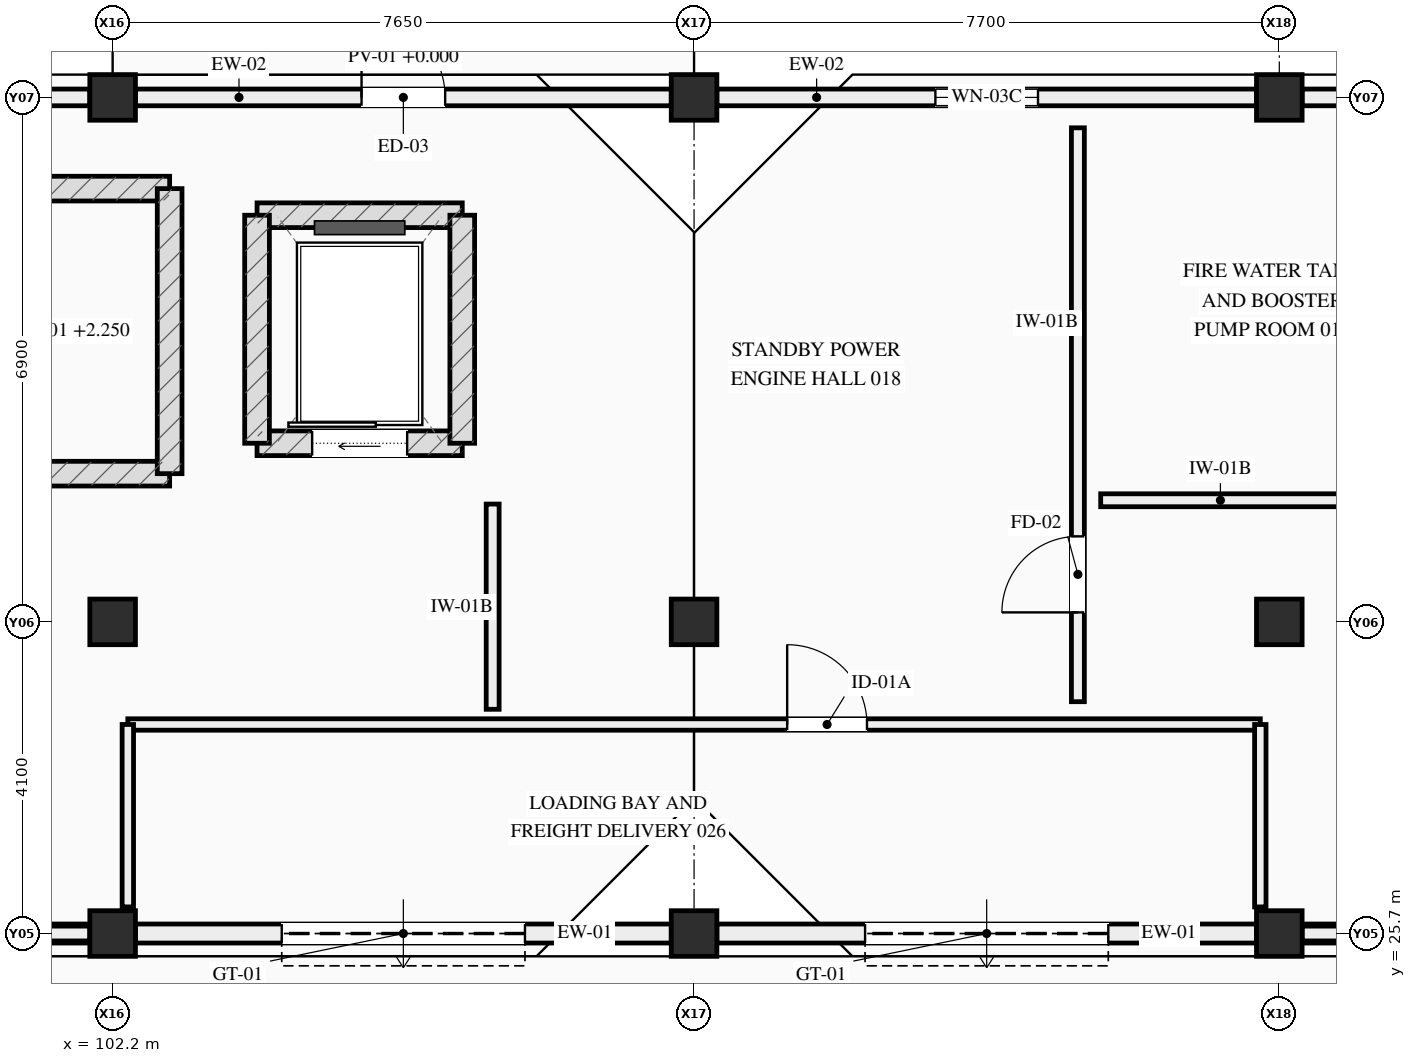
"""IFC4 building model, lengths in metres.
Left out: names, types, materials, properties, quantities, classifications, styles, units other than length and angle.
Written with IfcOpenShell. Run it as: python <this file> out.ifc"""

import sys

from ifc_helpers import new_model, si_unit, direction, frame, frame_2d, origin, origin_2d, place, context, subcontext, project, spatial, rectangle, extrude, element, fill, save


model = new_model("IFC4")
c1 = context("Model", 3, precision=1e-05, world=origin(), true_north=direction((0.0, 1.0)))
c2 = subcontext(c1, "Body", "Model", "MODEL_VIEW")
j1 = project(units=[si_unit("LENGTHUNIT", "METRE"), si_unit("PLANEANGLEUNIT", "RADIAN")], contexts=[c1])
p1 = place(None, origin())
s1 = spatial("IfcSite", under=j1, at=p1, CompositionType="ELEMENT")
p2 = place(p1, origin())
s2 = spatial("IfcBuilding", under=s1, at=p2, CompositionType="ELEMENT")
p3 = place(p2, origin())
s3 = spatial("IfcBuildingStorey", under=s2, at=p3, CompositionType="ELEMENT", Elevation=0.0)
for number, where, z_axis, x_axis in (
    (1, (102.2, 25.7, 0.0), (0.0, 0.0, 1.0), (1.0, 0.0, 0.0)),
    (2, (102.2, 29.8, 0.0), (0.0, 0.0, 1.0), (1.0, 0.0, 0.0)),
    (3, (102.2, 36.7, 0.0), (0.0, 0.0, 1.0), (1.0, 0.0, 0.0)),
    (4, (109.85, 25.7, 0.0), (0.0, 0.0, 1.0), (1.0, 0.0, 0.0)),
    (5, (109.85, 29.8, 0.0), (0.0, 0.0, 1.0), (1.0, 0.0, 0.0)),
    (6, (109.85, 36.7, 0.0), (0.0, 0.0, 1.0), (1.0, 0.0, 0.0)),
    (7, (117.55, 25.7, 0.0), (0.0, 0.0, 1.0), (1.0, 0.0, 0.0)),
    (8, (117.55, 29.8, 0.0), (0.0, 0.0, 1.0), (1.0, 0.0, 0.0)),
    (9, (117.55, 36.7, 0.0), (0.0, 0.0, 1.0), (1.0, 0.0, 0.0)),
):
    element("IfcColumn", number, at=place(p3, frame(where, z_axis=z_axis, x_axis=x_axis)), inside=s3, PredefinedType="COLUMN", context=c2, shape_type="SweptSolid", body=[
        extrude(rectangle(XDim=0.6, YDim=0.6, at=origin_2d()), origin(), (0.0, 0.0, 1.0), 4.5),
    ])
p4 = place(p3, frame((101.9, 25.7, 0.0), z_axis=(0.0, 0.0, 1.0), x_axis=(-1.0, 0.0, 0.0)))
e10 = element("IfcWall", 10, at=p4, inside=s3, PredefinedType="STANDARD", context=c2, shape_type="SweptSolid", body=[
    extrude(rectangle(XDim=7.0, YDim=0.25, at=frame_2d((3.5, 0.0))), origin(), (0.0, 0.0, 1.0), 2.985),
])
p5 = place(p4, frame((2.4, 0.0, 0.88)))
e11 = element("IfcOpeningElement", 11, at=p5, cuts=e10, PredefinedType="OPENING", context=c2, shape_type="SweptSolid", body=[
    extrude(rectangle(XDim=2.2, YDim=1.45, at=frame_2d((1.1, 0.725))), frame((0.0, 0.135, 0.0), z_axis=(0.0, -1.0, 0.0), x_axis=(1.0, 0.0, 0.0)), (0.0, 0.0, 1.0), 0.27),
])
p6 = place(p3, frame((101.9, 25.7, 3.35), z_axis=(0.0, 0.0, 1.0), x_axis=(-1.0, 0.0, 0.0)))
e12 = element("IfcWall", 12, at=p6, inside=s3, PredefinedType="STANDARD", context=c2, shape_type="SweptSolid", body=[
    extrude(rectangle(XDim=7.0, YDim=0.195, at=frame_2d((3.5, 0.0))), origin(), (0.0, 0.0, 1.0), 0.23),
])
p7 = place(p3, frame((94.9, 36.7, 0.0), z_axis=(0.0, 0.0, 1.0), x_axis=(1.0, 0.0, 0.0)))
e13 = element("IfcWall", 13, at=p7, inside=s3, PredefinedType="STANDARD", context=c2, shape_type="SweptSolid", body=[
    extrude(rectangle(XDim=7.0, YDim=0.22, at=frame_2d((3.5, 0.0))), origin(), (0.0, 0.0, 1.0), 3.58),
])
p8 = place(p7, frame((2.5, 0.0, 0.92)))
e14 = element("IfcOpeningElement", 14, at=p8, cuts=e13, PredefinedType="OPENING", context=c2, shape_type="SweptSolid", body=[
    extrude(rectangle(XDim=2.0, YDim=1.5, at=frame_2d((1.0, 0.75))), frame((0.0, 0.12, 0.0), z_axis=(0.0, -1.0, 0.0), x_axis=(1.0, 0.0, 0.0)), (0.0, 0.0, 1.0), 0.24),
])
p9 = place(p3, frame((109.55, 25.7, 0.0), z_axis=(0.0, 0.0, 1.0), x_axis=(-1.0, 0.0, 0.0)))
e15 = element("IfcWall", 15, at=p9, inside=s3, PredefinedType="STANDARD", context=c2, shape_type="SweptSolid", body=[
    extrude(rectangle(XDim=7.05, YDim=0.25, at=frame_2d((3.525, 0.0))), origin(), (0.0, 0.0, 1.0), 3.39),
])
p10 = place(p9, frame((1.925, 0.0, 0.0)))
e16 = element("IfcOpeningElement", 16, at=p10, cuts=e15, PredefinedType="OPENING", context=c2, shape_type="SweptSolid", body=[
    extrude(rectangle(XDim=3.2, YDim=2.95, at=frame_2d((1.6, 1.475))), frame((0.0, 0.135, 0.0), z_axis=(0.0, -1.0, 0.0), x_axis=(1.0, 0.0, 0.0)), (0.0, 0.0, 1.0), 0.27),
])
p11 = place(p3, frame((102.5, 36.7, 0.0), z_axis=(0.0, 0.0, 1.0), x_axis=(1.0, 0.0, 0.0)))
e17 = element("IfcWall", 17, at=p11, inside=s3, PredefinedType="STANDARD", context=c2, shape_type="SweptSolid", body=[
    extrude(rectangle(XDim=7.05, YDim=0.22, at=frame_2d((3.525, 0.0))), origin(), (0.0, 0.0, 1.0), 3.58),
])
p12 = place(p11, frame((2.975, 0.0, 0.0)))
e18 = element("IfcOpeningElement", 18, at=p12, cuts=e17, PredefinedType="OPENING", context=c2, shape_type="SweptSolid", body=[
    extrude(rectangle(XDim=1.1, YDim=2.2, at=frame_2d((0.55, 1.1))), frame((0.0, 0.12, 0.0), z_axis=(0.0, -1.0, 0.0), x_axis=(1.0, 0.0, 0.0)), (0.0, 0.0, 1.0), 0.24),
])
p13 = place(p3, frame((117.25, 25.7, 0.0), z_axis=(0.0, 0.0, 1.0), x_axis=(-1.0, 0.0, 0.0)))
e19 = element("IfcWall", 19, at=p13, inside=s3, PredefinedType="STANDARD", context=c2, shape_type="SweptSolid", body=[
    extrude(rectangle(XDim=7.1, YDim=0.25, at=frame_2d((3.55, 0.0))), origin(), (0.0, 0.0, 1.0), 3.39),
])
p14 = place(p13, frame((1.95, 0.0, 0.0)))
e20 = element("IfcOpeningElement", 20, at=p14, cuts=e19, PredefinedType="OPENING", context=c2, shape_type="SweptSolid", body=[
    extrude(rectangle(XDim=3.2, YDim=2.95, at=frame_2d((1.6, 1.475))), frame((0.0, 0.135, 0.0), z_axis=(0.0, -1.0, 0.0), x_axis=(1.0, 0.0, 0.0)), (0.0, 0.0, 1.0), 0.27),
])
p15 = place(p3, frame((110.15, 36.7, 0.0), z_axis=(0.0, 0.0, 1.0), x_axis=(1.0, 0.0, 0.0)))
e21 = element("IfcWall", 21, at=p15, inside=s3, PredefinedType="STANDARD", context=c2, shape_type="SweptSolid", body=[
    extrude(rectangle(XDim=7.1, YDim=0.22, at=frame_2d((3.55, 0.0))), origin(), (0.0, 0.0, 1.0), 3.58),
])
p16 = place(p15, frame((2.875, 0.0, 0.98)))
e22 = element("IfcOpeningElement", 22, at=p16, cuts=e21, PredefinedType="OPENING", context=c2, shape_type="SweptSolid", body=[
    extrude(rectangle(XDim=1.35, YDim=1.35, at=frame_2d((0.675, 0.675))), frame((0.0, 0.12, 0.0), z_axis=(0.0, -1.0, 0.0), x_axis=(1.0, 0.0, 0.0)), (0.0, 0.0, 1.0), 0.24),
])
p17 = place(p3, frame((124.95, 25.7, 0.0), z_axis=(0.0, 0.0, 1.0), x_axis=(-1.0, 0.0, 0.0)))
e23 = element("IfcWall", 23, at=p17, inside=s3, PredefinedType="STANDARD", context=c2, shape_type="SweptSolid", body=[
    extrude(rectangle(XDim=7.1, YDim=0.25, at=frame_2d((3.55, 0.0))), origin(), (0.0, 0.0, 1.0), 2.985),
])
p18 = place(p17, frame((3.025, 0.0, 1.02)))
e24 = element("IfcOpeningElement", 24, at=p18, cuts=e23, PredefinedType="OPENING", context=c2, shape_type="SweptSolid", body=[
    extrude(rectangle(XDim=1.05, YDim=1.2, at=frame_2d((0.525, 0.6))), frame((0.0, 0.135, 0.0), z_axis=(0.0, -1.0, 0.0), x_axis=(1.0, 0.0, 0.0)), (0.0, 0.0, 1.0), 0.27),
])
p19 = place(p3, frame((124.95, 25.7, 3.35), z_axis=(0.0, 0.0, 1.0), x_axis=(-1.0, 0.0, 0.0)))
e25 = element("IfcWall", 25, at=p19, inside=s3, PredefinedType="STANDARD", context=c2, shape_type="SweptSolid", body=[
    extrude(rectangle(XDim=7.1, YDim=0.195, at=frame_2d((3.55, 0.0))), origin(), (0.0, 0.0, 1.0), 0.23),
])
p20 = place(p3, frame((117.85, 36.7, 0.0), z_axis=(0.0, 0.0, 1.0), x_axis=(1.0, 0.0, 0.0)))
e26 = element("IfcWall", 26, at=p20, inside=s3, PredefinedType="STANDARD", context=c2, shape_type="SweptSolid", body=[
    extrude(rectangle(XDim=7.1, YDim=0.22, at=frame_2d((3.55, 0.0))), origin(), (0.0, 0.0, 1.0), 3.58),
])
p21 = place(p20, frame((2.05, 0.0, 0.88)))
e27 = element("IfcOpeningElement", 27, at=p21, cuts=e26, PredefinedType="OPENING", context=c2, shape_type="SweptSolid", body=[
    extrude(rectangle(XDim=3.0, YDim=1.45, at=frame_2d((1.5, 0.725))), frame((0.0, 0.12, 0.0), z_axis=(0.0, -1.0, 0.0), x_axis=(1.0, 0.0, 0.0)), (0.0, 0.0, 1.0), 0.24),
])
for number, where, z_axis, x_axis in (
    (28, (102.95, 31.75, 0.0), (0.0, 0.0, 1.0), (-1.0, 0.0, 0.0)),
    (29, (95.25, 35.5, 0.0), (0.0, 0.0, 1.0), (1.0, 0.0, 0.0)),
):
    element("IfcWall", number, at=place(p3, frame(where, z_axis=z_axis, x_axis=x_axis)), inside=s3, PredefinedType="SHEAR", context=c2, shape_type="SweptSolid", body=[
        extrude(rectangle(XDim=7.7, YDim=0.325, at=frame_2d((3.85, 0.0))), origin(), (0.0, 0.0, 1.0), 4.26),
    ])
p22 = place(p3, frame((102.95, 35.5, 0.0), z_axis=(0.0, 0.0, 1.0), x_axis=(0.0, -1.0, 0.0)))
e30 = element("IfcWall", 30, at=p22, inside=s3, PredefinedType="SHEAR", context=c2, shape_type="SweptSolid", body=[
    extrude(rectangle(XDim=3.75, YDim=0.325, at=frame_2d((1.875, 0.0))), origin(), (0.0, 0.0, 1.0), 4.26),
])
p23 = place(p3, frame((104.1, 32.15, 0.0), z_axis=(0.0, 0.0, 1.0), x_axis=(1.0, 0.0, 0.0)))
e31 = element("IfcWall", 31, at=p23, inside=s3, PredefinedType="SHEAR", context=c2, shape_type="SweptSolid", body=[
    extrude(rectangle(XDim=2.7, YDim=0.325, at=frame_2d((1.35, 0.0))), origin(), (0.0, 0.0, 1.0), 4.26),
])
p24 = place(p23, frame((0.725, 0.0, 0.0)))
e32 = element("IfcOpeningElement", 32, at=p24, cuts=e31, PredefinedType="OPENING", context=c2, shape_type="SweptSolid", body=[
    extrude(rectangle(XDim=1.25, YDim=2.2, at=frame_2d((0.625, 1.1))), frame((0.0, 0.172, 0.0), z_axis=(0.0, -1.0, 0.0), x_axis=(1.0, 0.0, 0.0)), (0.0, 0.0, 1.0), 0.345),
])
p25 = place(p3, frame((104.1, 35.15, 0.0), z_axis=(0.0, 0.0, 1.0), x_axis=(1.0, 0.0, 0.0)))
e33 = element("IfcWall", 33, at=p25, inside=s3, PredefinedType="SHEAR", context=c2, shape_type="SweptSolid", body=[
    extrude(rectangle(XDim=2.7, YDim=0.325, at=frame_2d((1.35, 0.0))), origin(), (0.0, 0.0, 1.0), 4.26),
])
for number, where, z_axis, x_axis in (
    (34, (104.1, 32.15, 0.0), (0.0, 0.0, 1.0), (0.0, 1.0, 0.0)),
    (35, (106.8, 32.15, 0.0), (0.0, 0.0, 1.0), (0.0, 1.0, 0.0)),
):
    element("IfcWall", number, at=place(p3, frame(where, z_axis=z_axis, x_axis=x_axis)), inside=s3, PredefinedType="SHEAR", context=c2, shape_type="SweptSolid", body=[
        extrude(rectangle(XDim=3.0, YDim=0.325, at=frame_2d((1.5, 0.0))), origin(), (0.0, 0.0, 1.0), 4.26),
    ])
p26 = place(p3, frame((102.4, 28.45, 0.0), z_axis=(0.0, 0.0, 1.0), x_axis=(1.0, 0.0, 0.0)))
e36 = element("IfcWall", 36, at=p26, inside=s3, PredefinedType="PARTITIONING", context=c2, shape_type="SweptSolid", body=[
    extrude(rectangle(XDim=14.9, YDim=0.15, at=frame_2d((7.45, 0.0))), origin(), (0.0, 0.0, 1.0), 3.3),
])
p27 = place(p26, frame((8.675, 0.0, 0.0)))
e37 = element("IfcOpeningElement", 37, at=p27, cuts=e36, PredefinedType="OPENING", context=c2, shape_type="SweptSolid", body=[
    extrude(rectangle(XDim=1.05, YDim=2.2, at=frame_2d((0.525, 1.1))), frame((0.0, 0.085, 0.0), z_axis=(0.0, -1.0, 0.0), x_axis=(1.0, 0.0, 0.0)), (0.0, 0.0, 1.0), 0.17),
])
for number, where, z_axis, x_axis in (
    (38, (102.4, 26.05, 0.0), (0.0, 0.0, 1.0), (0.0, 1.0, 0.0)),
    (39, (117.3, 26.05, 0.0), (0.0, 0.0, 1.0), (0.0, 1.0, 0.0)),
):
    element("IfcWall", number, at=place(p3, frame(where, z_axis=z_axis, x_axis=x_axis)), inside=s3, PredefinedType="PARTITIONING", context=c2, shape_type="SweptSolid", body=[
        extrude(rectangle(XDim=2.4, YDim=0.15, at=frame_2d((1.2, 0.0))), origin(), (0.0, 0.0, 1.0), 3.3),
    ])
p28 = place(p3, frame((107.2, 28.65, 0.0), z_axis=(0.0, 0.0, 1.0), x_axis=(0.0, 1.0, 0.0)))
e40 = element("IfcWall", 40, at=p28, inside=s3, PredefinedType="SOLIDWALL", context=c2, shape_type="SweptSolid", body=[
    extrude(rectangle(XDim=2.7, YDim=0.17, at=frame_2d((1.35, 0.0))), origin(), (0.0, 0.0, 1.0), 3.3),
])
p29 = place(p3, frame((114.9, 28.75, 0.0), z_axis=(0.0, 0.0, 1.0), x_axis=(0.0, 1.0, 0.0)))
e41 = element("IfcWall", 41, at=p29, inside=s3, PredefinedType="SOLIDWALL", context=c2, shape_type="SweptSolid", body=[
    extrude(rectangle(XDim=7.55, YDim=0.17, at=frame_2d((3.775, 0.0))), origin(), (0.0, 0.0, 1.0), 3.3),
])
p30 = place(p29, frame((1.175, 0.0, 0.0)))
e42 = element("IfcOpeningElement", 42, at=p30, cuts=e41, PredefinedType="OPENING", context=c2, shape_type="SweptSolid", body=[
    extrude(rectangle(XDim=1.0, YDim=2.15, at=frame_2d((0.5, 1.075))), frame((0.0, 0.095, 0.0), z_axis=(0.0, -1.0, 0.0), x_axis=(1.0, 0.0, 0.0)), (0.0, 0.0, 1.0), 0.19),
])
p31 = place(p3, frame((115.2, 31.4, 0.0), z_axis=(0.0, 0.0, 1.0), x_axis=(1.0, 0.0, 0.0)))
e43 = element("IfcWall", 43, at=p31, inside=s3, PredefinedType="SOLIDWALL", context=c2, shape_type="SweptSolid", body=[
    extrude(rectangle(XDim=5.0, YDim=0.17, at=frame_2d((2.5, 0.0))), origin(), (0.0, 0.0, 1.0), 3.3),
])
p32 = place(p31, frame((3.4, 0.0, 0.0)))
e44 = element("IfcOpeningElement", 44, at=p32, cuts=e43, PredefinedType="OPENING", context=c2, shape_type="SweptSolid", body=[
    extrude(rectangle(XDim=1.0, YDim=2.15, at=frame_2d((0.5, 1.075))), frame((0.0, 0.095, 0.0), z_axis=(0.0, -1.0, 0.0), x_axis=(1.0, 0.0, 0.0)), (0.0, 0.0, 1.0), 0.19),
])
p33 = place(p10, origin())
e45 = element("IfcDoor", 45, at=p33, inside=s3, OperationType="ROLLINGUP", PredefinedType="GATE", context=c2, shape_type="SweptSolid", body=[
    extrude(rectangle(XDim=3.2, YDim=2.95, at=frame_2d((1.6, 1.475))), frame((0.0, 0.025, 0.0), z_axis=(0.0, -1.0, 0.0), x_axis=(1.0, 0.0, 0.0)), (0.0, 0.0, 1.0), 0.05),
])
fill(e16, e45)
p34 = place(p12, origin())
e46 = element("IfcDoor", 46, at=p34, inside=s3, OperationType="SINGLE_SWING_LEFT", PredefinedType="DOOR", context=c2, shape_type="SweptSolid", body=[
    extrude(rectangle(XDim=1.1, YDim=2.2, at=frame_2d((0.55, 1.1))), frame((0.0, 0.025, 0.0), z_axis=(0.0, -1.0, 0.0), x_axis=(1.0, 0.0, 0.0)), (0.0, 0.0, 1.0), 0.05),
])
fill(e18, e46)
p35 = place(p14, origin())
e47 = element("IfcDoor", 47, at=p35, inside=s3, OperationType="ROLLINGUP", PredefinedType="GATE", context=c2, shape_type="SweptSolid", body=[
    extrude(rectangle(XDim=3.2, YDim=2.95, at=frame_2d((1.6, 1.475))), frame((0.0, 0.025, 0.0), z_axis=(0.0, -1.0, 0.0), x_axis=(1.0, 0.0, 0.0)), (0.0, 0.0, 1.0), 0.05),
])
fill(e20, e47)
p36 = place(p16, origin())
e48 = element("IfcWindow", 48, at=p36, inside=s3, PartitioningType="SINGLE_PANEL", PredefinedType="WINDOW", context=c2, shape_type="SweptSolid", body=[
    extrude(rectangle(XDim=1.35, YDim=1.35, at=frame_2d((0.675, 0.675))), frame((0.0, 0.03, 0.0), z_axis=(0.0, -1.0, 0.0), x_axis=(1.0, 0.0, 0.0)), (0.0, 0.0, 1.0), 0.06),
])
fill(e22, e48)
p37 = place(p24, origin())
e49 = element("IfcDoor", 49, at=p37, inside=s3, OperationType="SLIDING_TO_LEFT", PredefinedType="DOOR", context=c2, shape_type="SweptSolid", body=[
    extrude(rectangle(XDim=1.25, YDim=2.2, at=frame_2d((0.625, 1.1))), frame((0.0, 0.025, 0.0), z_axis=(0.0, -1.0, 0.0), x_axis=(1.0, 0.0, 0.0)), (0.0, 0.0, 1.0), 0.05),
])
fill(e32, e49)
p38 = place(p27, origin())
e50 = element("IfcDoor", 50, at=p38, inside=s3, OperationType="SINGLE_SWING_LEFT", PredefinedType="DOOR", context=c2, shape_type="SweptSolid", body=[
    extrude(rectangle(XDim=1.05, YDim=2.2, at=frame_2d((0.525, 1.1))), frame((0.0, 0.025, 0.0), z_axis=(0.0, -1.0, 0.0), x_axis=(1.0, 0.0, 0.0)), (0.0, 0.0, 1.0), 0.05),
])
fill(e37, e50)
p39 = place(p30, origin())
e51 = element("IfcDoor", 51, at=p39, inside=s3, OperationType="SINGLE_SWING_LEFT", PredefinedType="DOOR", context=c2, shape_type="SweptSolid", body=[
    extrude(rectangle(XDim=1.0, YDim=2.15, at=frame_2d((0.5, 1.075))), frame((0.0, 0.025, 0.0), z_axis=(0.0, -1.0, 0.0), x_axis=(1.0, 0.0, 0.0)), (0.0, 0.0, 1.0), 0.05),
])
fill(e42, e51)
save(model, sys.argv[1])
